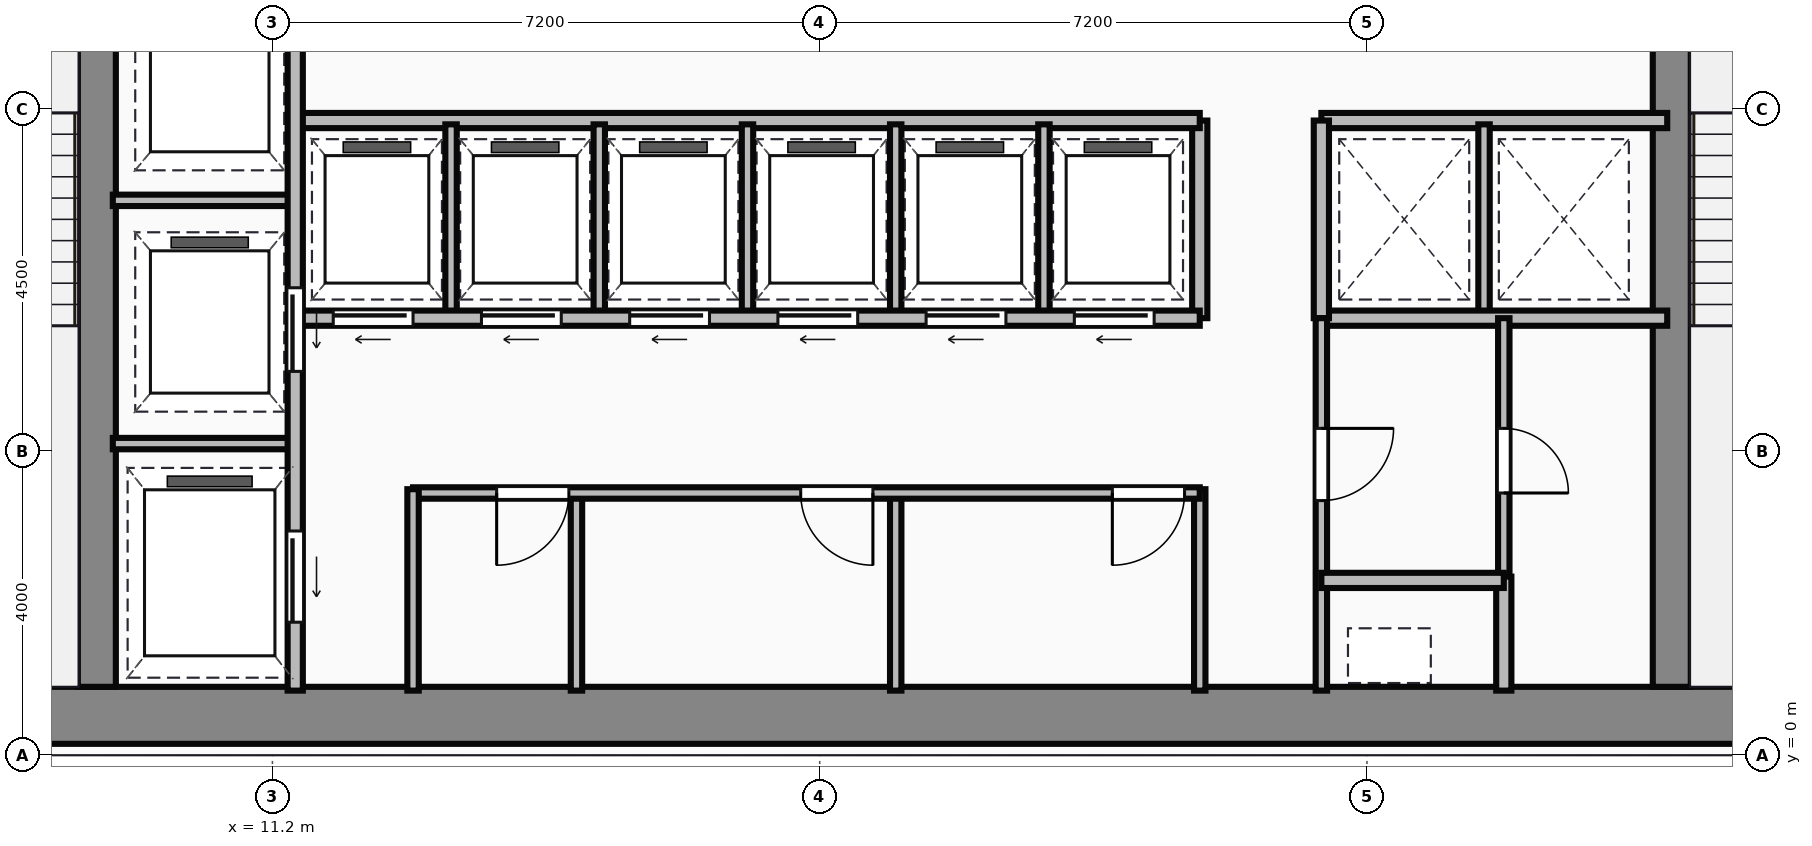
"""IFC4 building model, lengths in metres.
Left out: names, types, materials, properties, quantities, classifications, styles, units other than length and angle.
Written with IfcOpenShell. Run it as: python <this file> out.ifc"""

import sys

from ifc_helpers import new_model, si_unit, direction, frame, frame_2d, origin, place, context, subcontext, project, spatial, rectangle, extrude, source, transform, mapped, element, fill, save


model = new_model("IFC4")
c1 = context("Model", 3, precision=1e-05, world=origin(), true_north=direction((0.0, 1.0)))
c2 = subcontext(c1, "Body", "Model", "MODEL_VIEW")
j1 = project(units=[si_unit("LENGTHUNIT", "METRE"), si_unit("PLANEANGLEUNIT", "RADIAN")], contexts=[c1])
p1 = place(None, origin())
s1 = spatial("IfcSite", under=j1, at=p1, CompositionType="ELEMENT")
p2 = place(p1, origin())
s2 = spatial("IfcBuilding", under=s1, at=p2, CompositionType="ELEMENT")
p3 = place(p2, frame((0.0, 0.0, 147.9)))
s3 = spatial("IfcBuildingStorey", under=s2, at=p3, CompositionType="ELEMENT", Elevation=147.9)
m1 = source(origin(), c2, "Body", "SweptSolid", [
    extrude(rectangle(XDim=29.5, YDim=0.75, at=frame_2d((14.75, 0.0))), origin(), (0.0, 0.0, 1.0), 3.65),
])
p4 = place(p3, frame((4.5, 0.525, 0.0), z_axis=(0.0, 0.0, 1.0), x_axis=(1.0, 0.0, 0.0)))
e1 = element("IfcWall", 1, at=p4, inside=s3, PredefinedType="SHEAR", context=c2, shape_type="MappedRepresentation", body=[
    mapped(m1, transform((0.0, 0.0, 0.0))),
])
m2 = source(origin(), c2, "Body", "SweptSolid", [
    extrude(rectangle(XDim=12.35, YDim=0.5, at=frame_2d((6.175, 0.0))), origin(), (0.0, 0.0, 1.0), 3.65),
])
for number, where, z_axis, x_axis in (
    (2, (8.89, 0.9, 0.0), (0.0, 0.0, 1.0), (0.0, 1.0, 0.0)),
    (3, (29.61, 0.9, 0.0), (0.0, 0.0, 1.0), (0.0, 1.0, 0.0)),
):
    element("IfcWall", number, at=place(p3, frame(where, z_axis=z_axis, x_axis=x_axis)), inside=s3, PredefinedType="SHEAR", context=c2, shape_type="MappedRepresentation", body=[
        mapped(m2, transform((0.0, 0.0, 0.0))),
    ])
m3 = source(origin(), c2, "Body", "SweptSolid", [
    extrude(rectangle(XDim=9.6, YDim=0.2, at=frame_2d((4.8, 0.0))), origin(), (0.0, 0.0, 1.0), 3.4),
])
p5 = place(p3, frame((11.5, 0.85, 0.0), z_axis=(0.0, 0.0, 1.0), x_axis=(0.0, 1.0, 0.0)))
e4 = element("IfcWall", 4, at=p5, inside=s3, PredefinedType="PARTITIONING", context=c2, shape_type="MappedRepresentation", body=[
    mapped(m3, transform((0.0, 0.0, 0.0))),
])
p6 = place(p5, frame((4.2, 0.0, 0.0)))
e5 = element("IfcOpeningElement", 5, at=p6, cuts=e4, PredefinedType="OPENING", context=c2, shape_type="SweptSolid", body=[
    extrude(rectangle(XDim=1.1, YDim=2.15, at=frame_2d((0.55, 1.075))), frame((0.0, 0.11, 0.0), z_axis=(0.0, -1.0, 0.0), x_axis=(1.0, 0.0, 0.0)), (0.0, 0.0, 1.0), 0.22),
])
p7 = place(p5, frame((0.9, 0.0, 0.0)))
e6 = element("IfcOpeningElement", 6, at=p7, cuts=e4, PredefinedType="OPENING", context=c2, shape_type="SweptSolid", body=[
    extrude(rectangle(XDim=1.2, YDim=2.15, at=frame_2d((0.6, 1.075))), frame((0.0, 0.11, 0.0), z_axis=(0.0, -1.0, 0.0), x_axis=(1.0, 0.0, 0.0)), (0.0, 0.0, 1.0), 0.22),
])
m4 = source(origin(), c2, "Body", "SweptSolid", [
    extrude(rectangle(XDim=2.4, YDim=0.15, at=frame_2d((1.2, 0.0))), origin(), (0.0, 0.0, 1.0), 3.4),
])
for number, where, z_axis, x_axis in (
    (7, (9.1, 4.1, 0.0), (0.0, 0.0, 1.0), (1.0, 0.0, 0.0)),
    (8, (9.1, 7.3, 0.0), (0.0, 0.0, 1.0), (1.0, 0.0, 0.0)),
):
    element("IfcWall", number, at=place(p3, frame(where, z_axis=z_axis, x_axis=x_axis)), inside=s3, PredefinedType="PARTITIONING", context=c2, shape_type="MappedRepresentation", body=[
        mapped(m4, transform((0.0, 0.0, 0.0))),
    ])
m5 = source(origin(), c2, "Body", "SweptSolid", [
    extrude(rectangle(XDim=2.65, YDim=0.15, at=frame_2d((1.325, 0.0))), origin(), (0.0, 0.0, 1.0), 3.4),
])
p8 = place(p3, frame((13.05, 0.85, 0.0), z_axis=(0.0, 0.0, 1.0), x_axis=(0.0, 1.0, 0.0)))
e9 = element("IfcWall", 9, at=p8, inside=s3, PredefinedType="PARTITIONING", context=c2, shape_type="MappedRepresentation", body=[
    mapped(m5, transform((0.0, 0.0, 0.0))),
])
m6 = source(origin(), c2, "Body", "SweptSolid", [
    extrude(rectangle(XDim=10.35, YDim=0.15, at=frame_2d((5.175, 0.0))), origin(), (0.0, 0.0, 1.0), 3.4),
])
p9 = place(p3, frame((13.05, 3.45, 0.0), z_axis=(0.0, 0.0, 1.0), x_axis=(1.0, 0.0, 0.0)))
e10 = element("IfcWall", 10, at=p9, inside=s3, PredefinedType="PARTITIONING", context=c2, shape_type="MappedRepresentation", body=[
    mapped(m6, transform((0.0, 0.0, 0.0))),
])
p10 = place(p9, frame((1.1, 0.0, 0.0)))
e11 = element("IfcOpeningElement", 11, at=p10, cuts=e10, PredefinedType="OPENING", context=c2, shape_type="SweptSolid", body=[
    extrude(rectangle(XDim=0.95, YDim=2.15, at=frame_2d((0.475, 1.075))), frame((0.0, 0.085, 0.0), z_axis=(0.0, -1.0, 0.0), x_axis=(1.0, 0.0, 0.0)), (0.0, 0.0, 1.0), 0.17),
])
p11 = place(p9, frame((5.1, 0.0, 0.0)))
e12 = element("IfcOpeningElement", 12, at=p11, cuts=e10, PredefinedType="OPENING", context=c2, shape_type="SweptSolid", body=[
    extrude(rectangle(XDim=0.95, YDim=2.15, at=frame_2d((0.475, 1.075))), frame((0.0, 0.085, 0.0), z_axis=(0.0, -1.0, 0.0), x_axis=(1.0, 0.0, 0.0)), (0.0, 0.0, 1.0), 0.17),
])
p12 = place(p9, frame((9.2, 0.0, 0.0)))
e13 = element("IfcOpeningElement", 13, at=p12, cuts=e10, PredefinedType="OPENING", context=c2, shape_type="SweptSolid", body=[
    extrude(rectangle(XDim=0.95, YDim=2.15, at=frame_2d((0.475, 1.075))), frame((0.0, 0.085, 0.0), z_axis=(0.0, -1.0, 0.0), x_axis=(1.0, 0.0, 0.0)), (0.0, 0.0, 1.0), 0.17),
])
p13 = place(p3, frame((23.4, 0.85, 0.0), z_axis=(0.0, 0.0, 1.0), x_axis=(0.0, 1.0, 0.0)))
e14 = element("IfcWall", 14, at=p13, inside=s3, PredefinedType="PARTITIONING", context=c2, shape_type="MappedRepresentation", body=[
    mapped(m5, transform((0.0, 0.0, 0.0))),
])
m7 = source(origin(), c2, "Body", "SweptSolid", [
    extrude(rectangle(XDim=2.6, YDim=0.15, at=frame_2d((1.3, 0.0))), origin(), (0.0, 0.0, 1.0), 3.4),
])
for number, where, z_axis, x_axis in (
    (15, (15.2, 0.85, 0.0), (0.0, 0.0, 1.0), (0.0, 1.0, 0.0)),
    (16, (19.4, 0.85, 0.0), (0.0, 0.0, 1.0), (0.0, 1.0, 0.0)),
):
    element("IfcWall", number, at=place(p3, frame(where, z_axis=z_axis, x_axis=x_axis)), inside=s3, PredefinedType="PARTITIONING", context=c2, shape_type="MappedRepresentation", body=[
        mapped(m7, transform((0.0, 0.0, 0.0))),
    ])
m8 = source(origin(), c2, "Body", "SweptSolid", [
    extrude(rectangle(XDim=11.85, YDim=0.2, at=frame_2d((5.925, 0.0))), origin(), (0.0, 0.0, 1.0), 3.4),
])
p14 = place(p3, frame((11.55, 5.75, 0.0), z_axis=(0.0, 0.0, 1.0), x_axis=(1.0, 0.0, 0.0)))
e17 = element("IfcWall", 17, at=p14, inside=s3, PredefinedType="PARTITIONING", context=c2, shape_type="MappedRepresentation", body=[
    mapped(m8, transform((0.0, 0.0, 0.0))),
])
p15 = place(p14, frame((0.45, 0.0, 0.0)))
e18 = element("IfcOpeningElement", 18, at=p15, cuts=e17, PredefinedType="OPENING", context=c2, shape_type="SweptSolid", body=[
    extrude(rectangle(XDim=1.05, YDim=2.15, at=frame_2d((0.525, 1.075))), frame((0.0, 0.11, 0.0), z_axis=(0.0, -1.0, 0.0), x_axis=(1.0, 0.0, 0.0)), (0.0, 0.0, 1.0), 0.22),
])
p16 = place(p14, frame((2.4, 0.0, 0.0)))
e19 = element("IfcOpeningElement", 19, at=p16, cuts=e17, PredefinedType="OPENING", context=c2, shape_type="SweptSolid", body=[
    extrude(rectangle(XDim=1.05, YDim=2.15, at=frame_2d((0.525, 1.075))), frame((0.0, 0.11, 0.0), z_axis=(0.0, -1.0, 0.0), x_axis=(1.0, 0.0, 0.0)), (0.0, 0.0, 1.0), 0.22),
])
p17 = place(p14, frame((4.35, 0.0, 0.0)))
e20 = element("IfcOpeningElement", 20, at=p17, cuts=e17, PredefinedType="OPENING", context=c2, shape_type="SweptSolid", body=[
    extrude(rectangle(XDim=1.05, YDim=2.15, at=frame_2d((0.525, 1.075))), frame((0.0, 0.11, 0.0), z_axis=(0.0, -1.0, 0.0), x_axis=(1.0, 0.0, 0.0)), (0.0, 0.0, 1.0), 0.22),
])
p18 = place(p14, frame((6.3, 0.0, 0.0)))
e21 = element("IfcOpeningElement", 21, at=p18, cuts=e17, PredefinedType="OPENING", context=c2, shape_type="SweptSolid", body=[
    extrude(rectangle(XDim=1.05, YDim=2.15, at=frame_2d((0.525, 1.075))), frame((0.0, 0.11, 0.0), z_axis=(0.0, -1.0, 0.0), x_axis=(1.0, 0.0, 0.0)), (0.0, 0.0, 1.0), 0.22),
])
p19 = place(p14, frame((8.25, 0.0, 0.0)))
e22 = element("IfcOpeningElement", 22, at=p19, cuts=e17, PredefinedType="OPENING", context=c2, shape_type="SweptSolid", body=[
    extrude(rectangle(XDim=1.05, YDim=2.15, at=frame_2d((0.525, 1.075))), frame((0.0, 0.11, 0.0), z_axis=(0.0, -1.0, 0.0), x_axis=(1.0, 0.0, 0.0)), (0.0, 0.0, 1.0), 0.22),
])
p20 = place(p14, frame((10.2, 0.0, 0.0)))
e23 = element("IfcOpeningElement", 23, at=p20, cuts=e17, PredefinedType="OPENING", context=c2, shape_type="SweptSolid", body=[
    extrude(rectangle(XDim=1.05, YDim=2.15, at=frame_2d((0.525, 1.075))), frame((0.0, 0.11, 0.0), z_axis=(0.0, -1.0, 0.0), x_axis=(1.0, 0.0, 0.0)), (0.0, 0.0, 1.0), 0.22),
])
p21 = place(p3, frame((11.55, 8.35, 0.0), z_axis=(0.0, 0.0, 1.0), x_axis=(1.0, 0.0, 0.0)))
e24 = element("IfcWall", 24, at=p21, inside=s3, PredefinedType="PARTITIONING", context=c2, shape_type="MappedRepresentation", body=[
    mapped(m8, transform((0.0, 0.0, 0.0))),
])
m9 = source(origin(), c2, "Body", "SweptSolid", [
    extrude(rectangle(XDim=2.6, YDim=0.2, at=frame_2d((1.3, 0.0))), origin(), (0.0, 0.0, 1.0), 3.4),
])
p22 = place(p3, frame((23.4, 5.75, 0.0), z_axis=(0.0, 0.0, 1.0), x_axis=(0.0, 1.0, 0.0)))
e25 = element("IfcWall", 25, at=p22, inside=s3, PredefinedType="PARTITIONING", context=c2, shape_type="MappedRepresentation", body=[
    mapped(m9, transform((0.0, 0.0, 0.0))),
])
m10 = source(origin(), c2, "Body", "SweptSolid", [
    extrude(rectangle(XDim=2.5, YDim=0.15, at=frame_2d((1.25, 0.0))), origin(), (0.0, 0.0, 1.0), 3.4),
])
for number, where, z_axis, x_axis in (
    (26, (13.55, 5.8, 0.0), (0.0, 0.0, 1.0), (0.0, 1.0, 0.0)),
    (27, (15.5, 5.8, 0.0), (0.0, 0.0, 1.0), (0.0, 1.0, 0.0)),
    (28, (17.45, 5.8, 0.0), (0.0, 0.0, 1.0), (0.0, 1.0, 0.0)),
    (29, (19.4, 5.8, 0.0), (0.0, 0.0, 1.0), (0.0, 1.0, 0.0)),
    (30, (21.35, 5.8, 0.0), (0.0, 0.0, 1.0), (0.0, 1.0, 0.0)),
):
    element("IfcWall", number, at=place(p3, frame(where, z_axis=z_axis, x_axis=x_axis)), inside=s3, PredefinedType="PARTITIONING", context=c2, shape_type="MappedRepresentation", body=[
        mapped(m10, transform((0.0, 0.0, 0.0))),
    ])
m11 = source(origin(), c2, "Body", "SweptSolid", [
    extrude(rectangle(XDim=4.55, YDim=0.2, at=frame_2d((2.275, 0.0))), origin(), (0.0, 0.0, 1.0), 3.4),
])
for number, where, z_axis, x_axis in (
    (31, (25.0, 8.35, 0.0), (0.0, 0.0, 1.0), (1.0, 0.0, 0.0)),
    (32, (25.0, 5.75, 0.0), (0.0, 0.0, 1.0), (1.0, 0.0, 0.0)),
):
    element("IfcWall", number, at=place(p3, frame(where, z_axis=z_axis, x_axis=x_axis)), inside=s3, PredefinedType="PARTITIONING", context=c2, shape_type="MappedRepresentation", body=[
        mapped(m11, transform((0.0, 0.0, 0.0))),
    ])
p23 = place(p3, frame((25.0, 5.75, 0.0), z_axis=(0.0, 0.0, 1.0), x_axis=(0.0, 1.0, 0.0)))
e33 = element("IfcWall", 33, at=p23, inside=s3, PredefinedType="PARTITIONING", context=c2, shape_type="MappedRepresentation", body=[
    mapped(m9, transform((0.0, 0.0, 0.0))),
])
p24 = place(p3, frame((27.14, 5.8, 0.0), z_axis=(0.0, 0.0, 1.0), x_axis=(0.0, 1.0, 0.0)))
e34 = element("IfcWall", 34, at=p24, inside=s3, PredefinedType="PARTITIONING", context=c2, shape_type="MappedRepresentation", body=[
    mapped(m10, transform((0.0, 0.0, 0.0))),
])
m12 = source(origin(), c2, "Body", "SweptSolid", [
    extrude(rectangle(XDim=4.9, YDim=0.15, at=frame_2d((2.45, 0.0))), origin(), (0.0, 0.0, 1.0), 3.4),
])
p25 = place(p3, frame((25.0, 0.85, 0.0), z_axis=(0.0, 0.0, 1.0), x_axis=(0.0, 1.0, 0.0)))
e35 = element("IfcWall", 35, at=p25, inside=s3, PredefinedType="PARTITIONING", context=c2, shape_type="MappedRepresentation", body=[
    mapped(m12, transform((0.0, 0.0, 0.0))),
])
p26 = place(p25, frame((2.5, 0.0, 0.0)))
e36 = element("IfcOpeningElement", 36, at=p26, cuts=e35, PredefinedType="OPENING", context=c2, shape_type="SweptSolid", body=[
    extrude(rectangle(XDim=0.95, YDim=2.15, at=frame_2d((0.475, 1.075))), frame((0.0, 0.085, 0.0), z_axis=(0.0, -1.0, 0.0), x_axis=(1.0, 0.0, 0.0)), (0.0, 0.0, 1.0), 0.17),
])
m13 = source(origin(), c2, "Body", "SweptSolid", [
    extrude(rectangle(XDim=2.4, YDim=0.2, at=frame_2d((1.2, 0.0))), origin(), (0.0, 0.0, 1.0), 3.4),
])
p27 = place(p3, frame((25.0, 2.3, 0.0), z_axis=(0.0, 0.0, 1.0), x_axis=(1.0, 0.0, 0.0)))
e37 = element("IfcWall", 37, at=p27, inside=s3, PredefinedType="PARTITIONING", context=c2, shape_type="MappedRepresentation", body=[
    mapped(m13, transform((0.0, 0.0, 0.0))),
])
m14 = source(origin(), c2, "Body", "SweptSolid", [
    extrude(rectangle(XDim=1.5, YDim=0.2, at=frame_2d((0.75, 0.0))), origin(), (0.0, 0.0, 1.0), 3.4),
])
p28 = place(p3, frame((27.4, 0.85, 0.0), z_axis=(0.0, 0.0, 1.0), x_axis=(0.0, 1.0, 0.0)))
e38 = element("IfcWall", 38, at=p28, inside=s3, PredefinedType="PARTITIONING", context=c2, shape_type="MappedRepresentation", body=[
    mapped(m14, transform((0.0, 0.0, 0.0))),
])
m15 = source(origin(), c2, "Body", "SweptSolid", [
    extrude(rectangle(XDim=3.4, YDim=0.15, at=frame_2d((1.7, 0.0))), origin(), (0.0, 0.0, 1.0), 3.4),
])
p29 = place(p3, frame((27.4, 2.35, 0.0), z_axis=(0.0, 0.0, 1.0), x_axis=(0.0, 1.0, 0.0)))
e39 = element("IfcWall", 39, at=p29, inside=s3, PredefinedType="PARTITIONING", context=c2, shape_type="MappedRepresentation", body=[
    mapped(m15, transform((0.0, 0.0, 0.0))),
])
p30 = place(p29, frame((1.1, 0.0, 0.0)))
e40 = element("IfcOpeningElement", 40, at=p30, cuts=e39, PredefinedType="OPENING", context=c2, shape_type="SweptSolid", body=[
    extrude(rectangle(XDim=0.85, YDim=2.1, at=frame_2d((0.425, 1.05))), frame((0.0, 0.085, 0.0), z_axis=(0.0, -1.0, 0.0), x_axis=(1.0, 0.0, 0.0)), (0.0, 0.0, 1.0), 0.17),
])
m16 = source(origin(), c2, "Body", "SweptSolid", [
    extrude(rectangle(XDim=1.1, YDim=2.15, at=frame_2d((0.55, 1.075))), frame((0.0, 0.025, 0.0), z_axis=(0.0, -1.0, 0.0), x_axis=(1.0, 0.0, 0.0)), (0.0, 0.0, 1.0), 0.05),
])
p31 = place(p6, frame((1.1, 0.0, 0.0), z_axis=(0.0, 0.0, 1.0), x_axis=(-1.0, 0.0, 0.0)))
e41 = element("IfcDoor", 41, at=p31, inside=s3, OperationType="SLIDING_TO_LEFT", PredefinedType="DOOR", context=c2, shape_type="MappedRepresentation", body=[
    mapped(m16, transform((0.0, 0.0, 0.0))),
])
fill(e5, e41)
m17 = source(origin(), c2, "Body", "SweptSolid", [
    extrude(rectangle(XDim=1.2, YDim=2.15, at=frame_2d((0.6, 1.075))), frame((0.0, 0.025, 0.0), z_axis=(0.0, -1.0, 0.0), x_axis=(1.0, 0.0, 0.0)), (0.0, 0.0, 1.0), 0.05),
])
p32 = place(p7, frame((1.2, 0.0, 0.0), z_axis=(0.0, 0.0, 1.0), x_axis=(-1.0, 0.0, 0.0)))
e42 = element("IfcDoor", 42, at=p32, inside=s3, OperationType="SLIDING_TO_LEFT", PredefinedType="DOOR", context=c2, shape_type="MappedRepresentation", body=[
    mapped(m17, transform((0.0, 0.0, 0.0))),
])
fill(e6, e42)
m18 = source(origin(), c2, "Body", "SweptSolid", [
    extrude(rectangle(XDim=0.95, YDim=2.15, at=frame_2d((0.475, 1.075))), frame((0.0, 0.025, 0.0), z_axis=(0.0, -1.0, 0.0), x_axis=(1.0, 0.0, 0.0)), (0.0, 0.0, 1.0), 0.05),
])
p33 = place(p10, origin())
e43 = element("IfcDoor", 43, at=p33, inside=s3, OperationType="SINGLE_SWING_LEFT", PredefinedType="DOOR", context=c2, shape_type="MappedRepresentation", body=[
    mapped(m18, transform((0.0, 0.0, 0.0))),
])
fill(e11, e43)
p34 = place(p11, origin())
e44 = element("IfcDoor", 44, at=p34, inside=s3, OperationType="SINGLE_SWING_RIGHT", PredefinedType="DOOR", context=c2, shape_type="MappedRepresentation", body=[
    mapped(m18, transform((0.0, 0.0, 0.0))),
])
fill(e12, e44)
p35 = place(p12, origin())
e45 = element("IfcDoor", 45, at=p35, inside=s3, OperationType="SINGLE_SWING_LEFT", PredefinedType="DOOR", context=c2, shape_type="MappedRepresentation", body=[
    mapped(m18, transform((0.0, 0.0, 0.0))),
])
fill(e13, e45)
m19 = source(origin(), c2, "Body", "SweptSolid", [
    extrude(rectangle(XDim=1.05, YDim=2.15, at=frame_2d((0.525, 1.075))), frame((0.0, 0.025, 0.0), z_axis=(0.0, -1.0, 0.0), x_axis=(1.0, 0.0, 0.0)), (0.0, 0.0, 1.0), 0.05),
])
p36 = place(p15, frame((1.05, 0.0, 0.0), z_axis=(0.0, 0.0, 1.0), x_axis=(-1.0, 0.0, 0.0)))
e46 = element("IfcDoor", 46, at=p36, inside=s3, OperationType="SLIDING_TO_LEFT", PredefinedType="DOOR", context=c2, shape_type="MappedRepresentation", body=[
    mapped(m19, transform((0.0, 0.0, 0.0))),
])
fill(e18, e46)
p37 = place(p16, frame((1.05, 0.0, 0.0), z_axis=(0.0, 0.0, 1.0), x_axis=(-1.0, 0.0, 0.0)))
e47 = element("IfcDoor", 47, at=p37, inside=s3, OperationType="SLIDING_TO_LEFT", PredefinedType="DOOR", context=c2, shape_type="MappedRepresentation", body=[
    mapped(m19, transform((0.0, 0.0, 0.0))),
])
fill(e19, e47)
p38 = place(p17, frame((1.05, 0.0, 0.0), z_axis=(0.0, 0.0, 1.0), x_axis=(-1.0, 0.0, 0.0)))
e48 = element("IfcDoor", 48, at=p38, inside=s3, OperationType="SLIDING_TO_LEFT", PredefinedType="DOOR", context=c2, shape_type="MappedRepresentation", body=[
    mapped(m19, transform((0.0, 0.0, 0.0))),
])
fill(e20, e48)
p39 = place(p18, frame((1.05, 0.0, 0.0), z_axis=(0.0, 0.0, 1.0), x_axis=(-1.0, 0.0, 0.0)))
e49 = element("IfcDoor", 49, at=p39, inside=s3, OperationType="SLIDING_TO_LEFT", PredefinedType="DOOR", context=c2, shape_type="MappedRepresentation", body=[
    mapped(m19, transform((0.0, 0.0, 0.0))),
])
fill(e21, e49)
p40 = place(p19, frame((1.05, 0.0, 0.0), z_axis=(0.0, 0.0, 1.0), x_axis=(-1.0, 0.0, 0.0)))
e50 = element("IfcDoor", 50, at=p40, inside=s3, OperationType="SLIDING_TO_LEFT", PredefinedType="DOOR", context=c2, shape_type="MappedRepresentation", body=[
    mapped(m19, transform((0.0, 0.0, 0.0))),
])
fill(e22, e50)
p41 = place(p20, frame((1.05, 0.0, 0.0), z_axis=(0.0, 0.0, 1.0), x_axis=(-1.0, 0.0, 0.0)))
e51 = element("IfcDoor", 51, at=p41, inside=s3, OperationType="SLIDING_TO_LEFT", PredefinedType="DOOR", context=c2, shape_type="MappedRepresentation", body=[
    mapped(m19, transform((0.0, 0.0, 0.0))),
])
fill(e23, e51)
p42 = place(p26, origin())
e52 = element("IfcDoor", 52, at=p42, inside=s3, OperationType="SINGLE_SWING_RIGHT", PredefinedType="DOOR", context=c2, shape_type="MappedRepresentation", body=[
    mapped(m18, transform((0.0, 0.0, 0.0))),
])
fill(e36, e52)
m20 = source(origin(), c2, "Body", "SweptSolid", [
    extrude(rectangle(XDim=0.85, YDim=2.1, at=frame_2d((0.425, 1.05))), frame((0.0, 0.025, 0.0), z_axis=(0.0, -1.0, 0.0), x_axis=(1.0, 0.0, 0.0)), (0.0, 0.0, 1.0), 0.05),
])
p43 = place(p30, frame((0.85, 0.0, 0.0), z_axis=(0.0, 0.0, 1.0), x_axis=(-1.0, 0.0, 0.0)))
e53 = element("IfcDoor", 53, at=p43, inside=s3, OperationType="SINGLE_SWING_LEFT", PredefinedType="DOOR", context=c2, shape_type="MappedRepresentation", body=[
    mapped(m20, transform((0.0, 0.0, 0.0))),
])
fill(e40, e53)
save(model, sys.argv[1])
